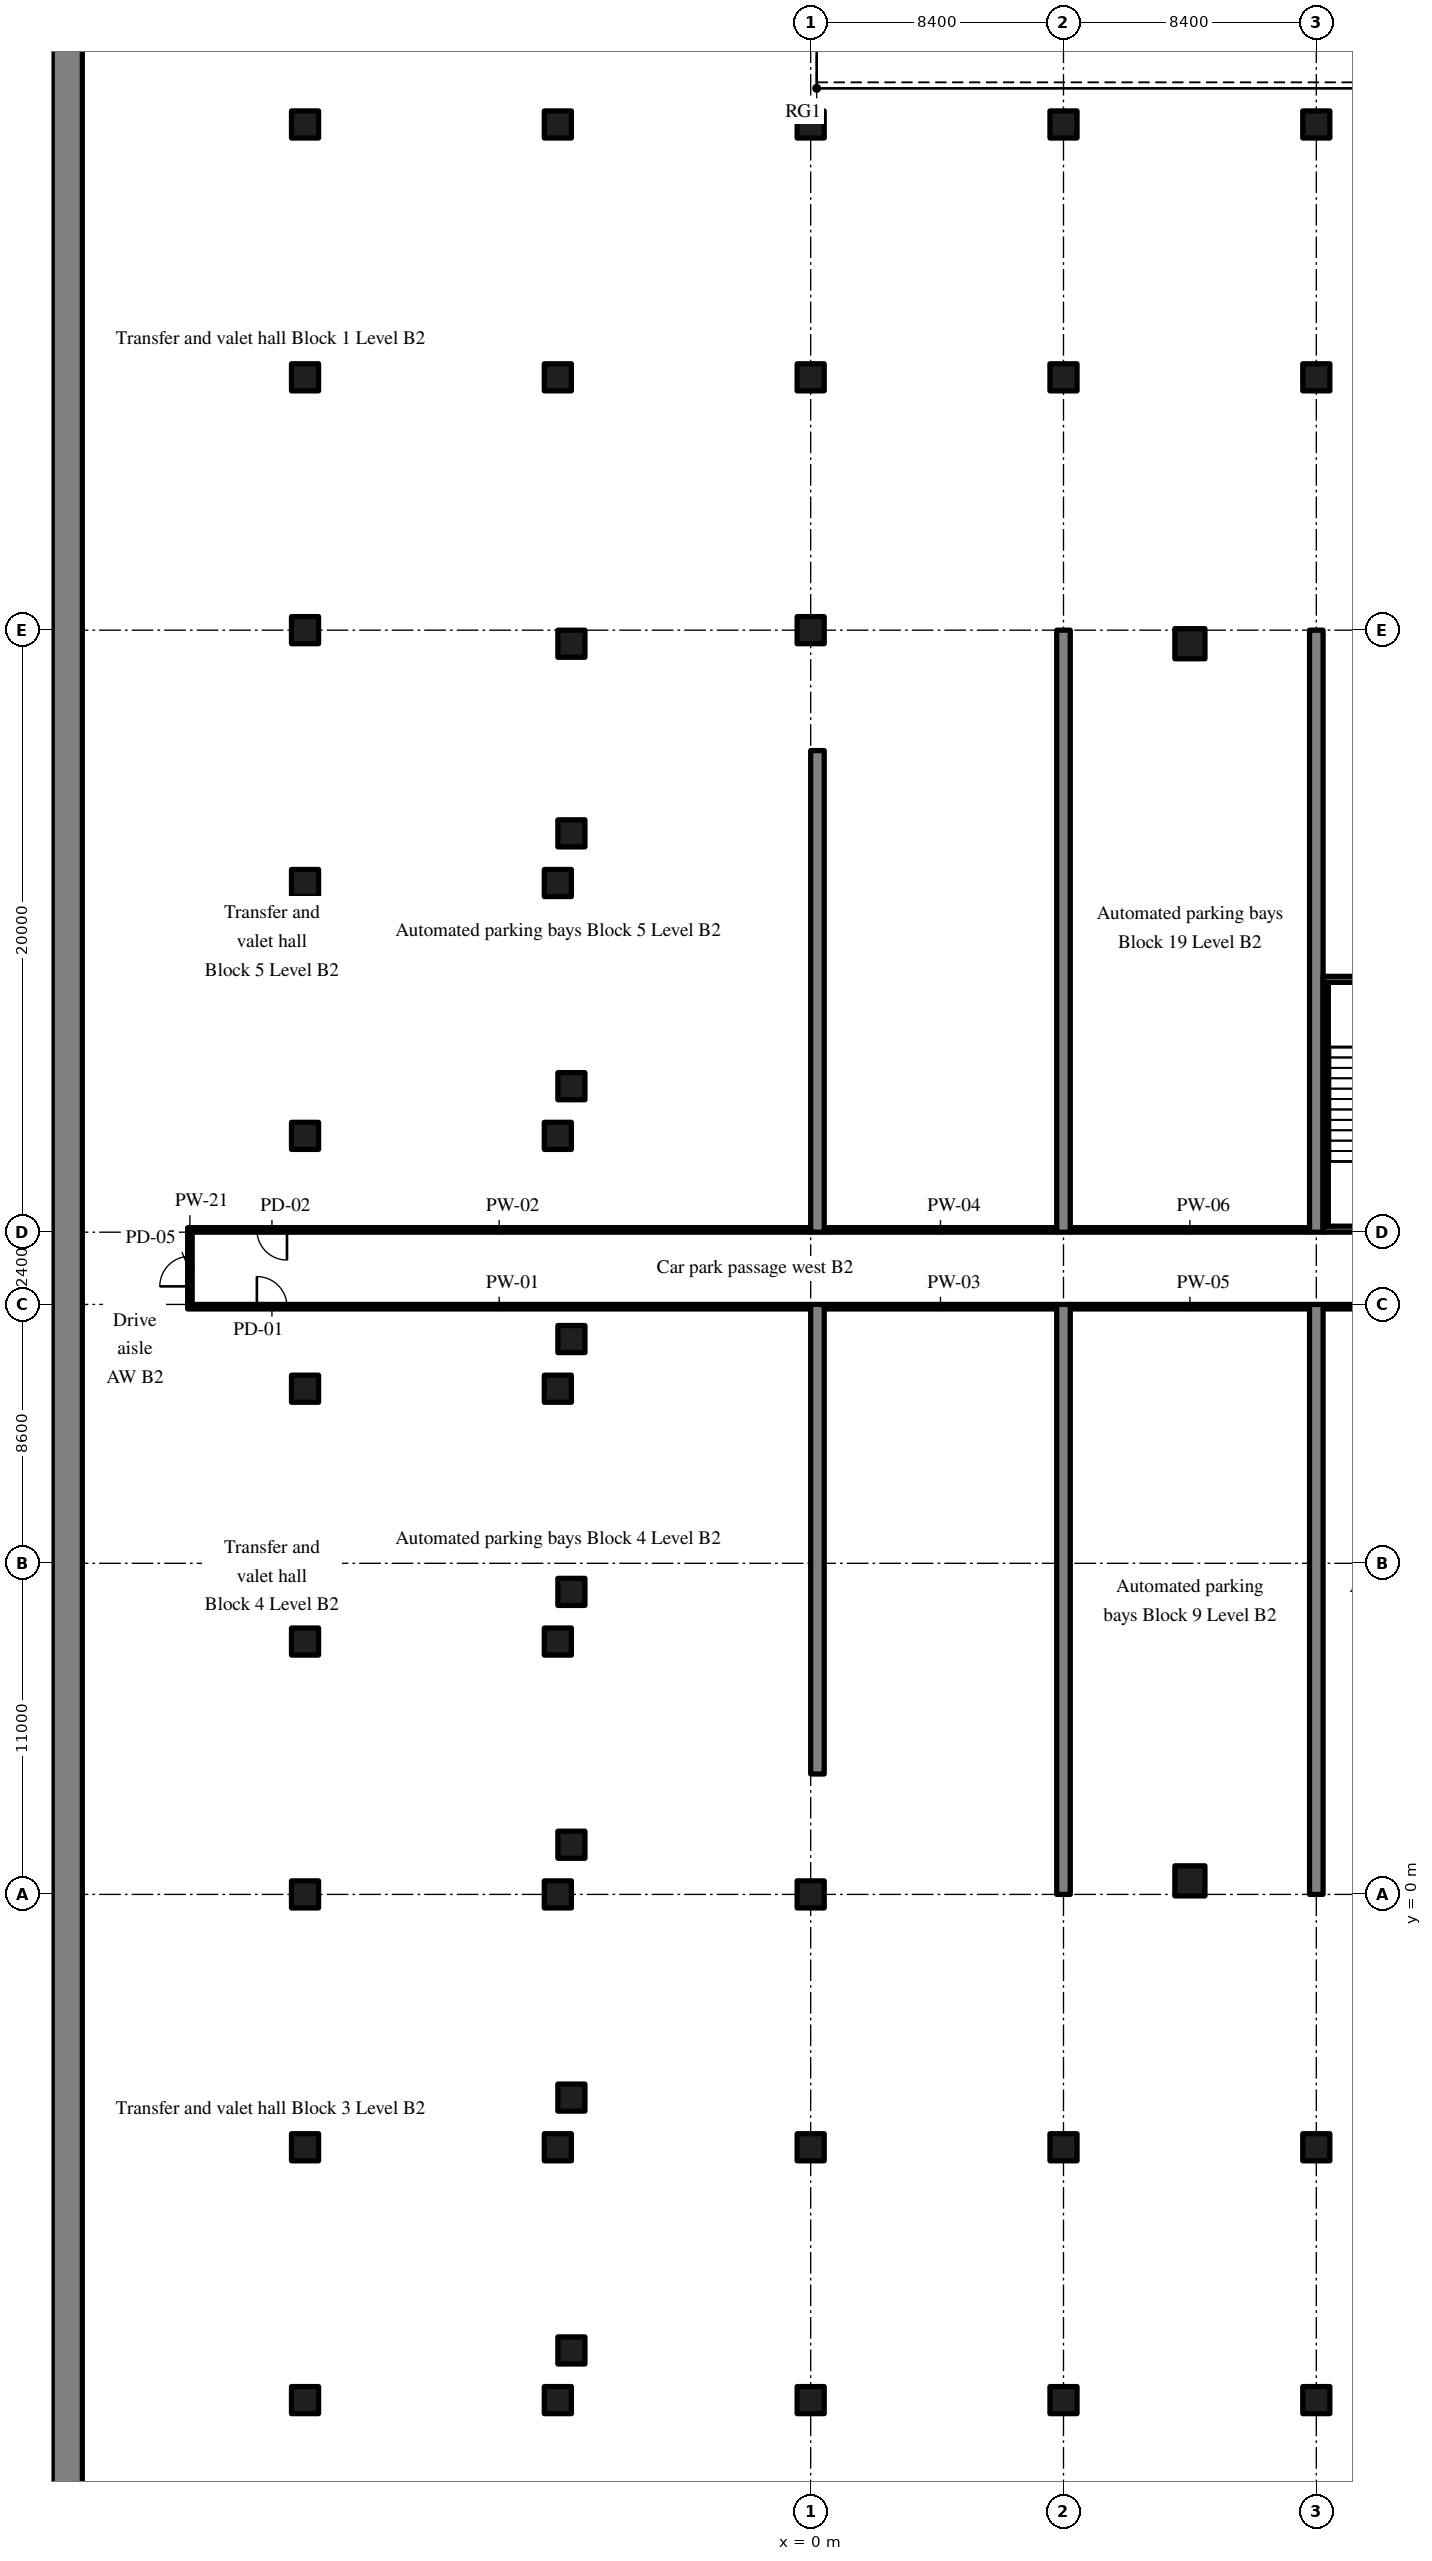
"""IFC4 building model, lengths in metres.
Left out: names, types, materials, properties, quantities, classifications, styles, units other than length and angle.
Written with IfcOpenShell. Run it as: python <this file> out.ifc"""

import sys

from ifc_helpers import new_model, si_unit, direction, frame, frame_2d, origin, origin_2d, place, context, subcontext, project, spatial, rectangle, extrude, source, transform, mapped, element, fill, save


model = new_model("IFC4")
c1 = context("Model", 3, precision=1e-05, world=origin(), true_north=direction((0.0, 1.0)))
c2 = subcontext(c1, "Body", "Model", "MODEL_VIEW")
j1 = project(units=[si_unit("LENGTHUNIT", "METRE"), si_unit("PLANEANGLEUNIT", "RADIAN")], contexts=[c1])
p1 = place(None, origin())
s1 = spatial("IfcSite", under=j1, at=p1, CompositionType="ELEMENT")
p2 = place(p1, origin())
s2 = spatial("IfcBuilding", under=s1, at=p2, CompositionType="ELEMENT")
p3 = place(p2, frame((0.0, 0.0, -9.0)))
s3 = spatial("IfcBuildingStorey", under=s2, at=p3, CompositionType="ELEMENT", Elevation=-9.0)
m1 = source(origin(), c2, "Body", "SweptSolid", [
    extrude(rectangle(XDim=98.8, YDim=1.0, at=frame_2d((49.4, 0.0))), origin(), (0.0, 0.0, 1.0), 4.22),
])
p4 = place(p3, frame((-24.7, -32.6, 0.0), z_axis=(0.0, 0.0, 1.0), x_axis=(0.0, 1.0, 0.0)))
e1 = element("IfcWall", 1, at=p4, inside=s3, PredefinedType="SHEAR", context=c2, shape_type="MappedRepresentation", body=[
    mapped(m1, transform((0.0, 0.0, 0.0), scale=1.0)),
])
m2 = source(origin(), c2, "Body", "SweptSolid", [
    extrude(rectangle(XDim=15.6, YDim=0.45, at=frame_2d((7.8, 0.0))), origin(), (0.0, 0.0, 1.0), 4.22),
])
p5 = place(p3, frame((0.225, 4.0, 0.0), z_axis=(0.0, 0.0, 1.0), x_axis=(0.0, 1.0, 0.0)))
e2 = element("IfcWall", 2, at=p5, inside=s3, PredefinedType="SHEAR", context=c2, shape_type="MappedRepresentation", body=[
    mapped(m2, transform((0.0, 0.0, 0.0), scale=1.0)),
])
m3 = source(origin(), c2, "Body", "SweptSolid", [
    extrude(rectangle(XDim=16.0, YDim=0.45, at=frame_2d((8.0, 0.0))), origin(), (0.0, 0.0, 1.0), 4.22),
])
p6 = place(p3, frame((0.225, 22.0, 0.0), z_axis=(0.0, 0.0, 1.0), x_axis=(0.0, 1.0, 0.0)))
e3 = element("IfcWall", 3, at=p6, inside=s3, PredefinedType="SHEAR", context=c2, shape_type="MappedRepresentation", body=[
    mapped(m3, transform((0.0, 0.0, 0.0), scale=1.0)),
])
m4 = source(origin(), c2, "Body", "SweptSolid", [
    extrude(rectangle(XDim=19.6, YDim=0.45, at=frame_2d((9.8, 0.0))), origin(), (0.0, 0.0, 1.0), 4.22),
])
p7 = place(p3, frame((8.4, 0.0, 0.0), z_axis=(0.0, 0.0, 1.0), x_axis=(0.0, 1.0, 0.0)))
e4 = element("IfcWall", 4, at=p7, inside=s3, PredefinedType="SHEAR", context=c2, shape_type="MappedRepresentation", body=[
    mapped(m4, transform((0.0, 0.0, 0.0), scale=1.0)),
])
m5 = source(origin(), c2, "Body", "SweptSolid", [
    extrude(rectangle(XDim=20.0, YDim=0.45, at=frame_2d((10.0, 0.0))), origin(), (0.0, 0.0, 1.0), 4.22),
])
p8 = place(p3, frame((8.4, 22.0, 0.0), z_axis=(0.0, 0.0, 1.0), x_axis=(0.0, 1.0, 0.0)))
e5 = element("IfcWall", 5, at=p8, inside=s3, PredefinedType="SHEAR", context=c2, shape_type="MappedRepresentation", body=[
    mapped(m5, transform((0.0, 0.0, 0.0), scale=1.0)),
])
p9 = place(p3, frame((16.8, 0.0, 0.0), z_axis=(0.0, 0.0, 1.0), x_axis=(0.0, 1.0, 0.0)))
e6 = element("IfcWall", 6, at=p9, inside=s3, PredefinedType="SHEAR", context=c2, shape_type="MappedRepresentation", body=[
    mapped(m4, transform((0.0, 0.0, 0.0), scale=1.0)),
])
p10 = place(p3, frame((16.8, 22.0, 0.0), z_axis=(0.0, 0.0, 1.0), x_axis=(0.0, 1.0, 0.0)))
e7 = element("IfcWall", 7, at=p10, inside=s3, PredefinedType="SHEAR", context=c2, shape_type="MappedRepresentation", body=[
    mapped(m5, transform((0.0, 0.0, 0.0), scale=1.0)),
])
m6 = source(origin(), c2, "Body", "SweptSolid", [
    extrude(rectangle(XDim=1.0, YDim=1.0, at=origin_2d()), origin(), (0.0, 0.0, 1.0), 4.22),
])
for number, where, z_axis, x_axis in (
    (8, (12.6, 0.45, 0.0), (0.0, 0.0, 1.0), (1.0, 0.0, 0.0)),
    (9, (12.6, 41.55, 0.0), (0.0, 0.0, 1.0), (1.0, 0.0, 0.0)),
):
    element("IfcColumn", number, at=place(p3, frame(where, z_axis=z_axis, x_axis=x_axis)), inside=s3, PredefinedType="COLUMN", context=c2, shape_type="MappedRepresentation", body=[
        mapped(m6, transform((0.0, 0.0, 0.0), scale=1.0)),
    ])
m7 = source(origin(), c2, "Body", "SweptSolid", [
    extrude(rectangle(XDim=0.9, YDim=0.9, at=origin_2d()), origin(), (0.0, 0.0, 1.0), 4.22),
])
for number, where, z_axis, x_axis in (
    (10, (-7.95, -15.15, 0.0), (0.0, 0.0, 1.0), (1.0, 0.0, 0.0)),
    (11, (-7.95, -6.75, 0.0), (0.0, 0.0, 1.0), (1.0, 0.0, 0.0)),
    (12, (-7.95, 1.65, 0.0), (0.0, 0.0, 1.0), (1.0, 0.0, 0.0)),
    (13, (-7.95, 10.05, 0.0), (0.0, 0.0, 1.0), (1.0, 0.0, 0.0)),
    (14, (-7.95, 18.45, 0.0), (0.0, 0.0, 1.0), (1.0, 0.0, 0.0)),
    (15, (-7.95, 26.85, 0.0), (0.0, 0.0, 1.0), (1.0, 0.0, 0.0)),
    (16, (-7.95, 35.25, 0.0), (0.0, 0.0, 1.0), (1.0, 0.0, 0.0)),
    (17, (-7.95, 41.55, 0.0), (0.0, 0.0, 1.0), (1.0, 0.0, 0.0)),
    (18, (-16.8, -16.8, 0.0), (0.0, 0.0, 1.0), (1.0, 0.0, 0.0)),
    (19, (-16.8, -8.4, 0.0), (0.0, 0.0, 1.0), (1.0, 0.0, 0.0)),
    (20, (-16.8, 0.0, 0.0), (0.0, 0.0, 1.0), (1.0, 0.0, 0.0)),
    (21, (-16.8, 8.4, 0.0), (0.0, 0.0, 1.0), (1.0, 0.0, 0.0)),
    (22, (-16.8, 16.8, 0.0), (0.0, 0.0, 1.0), (1.0, 0.0, 0.0)),
    (23, (-16.8, 25.2, 0.0), (0.0, 0.0, 1.0), (1.0, 0.0, 0.0)),
    (24, (-16.8, 33.6, 0.0), (0.0, 0.0, 1.0), (1.0, 0.0, 0.0)),
    (25, (-16.8, 42.0, 0.0), (0.0, 0.0, 1.0), (1.0, 0.0, 0.0)),
    (26, (-16.8, 50.4, 0.0), (0.0, 0.0, 1.0), (1.0, 0.0, 0.0)),
    (27, (-16.8, 58.8, 0.0), (0.0, 0.0, 1.0), (1.0, 0.0, 0.0)),
    (28, (-8.4, -16.8, 0.0), (0.0, 0.0, 1.0), (1.0, 0.0, 0.0)),
    (29, (-8.4, -8.4, 0.0), (0.0, 0.0, 1.0), (1.0, 0.0, 0.0)),
    (30, (-8.4, 0.0, 0.0), (0.0, 0.0, 1.0), (1.0, 0.0, 0.0)),
    (31, (-8.4, 8.4, 0.0), (0.0, 0.0, 1.0), (1.0, 0.0, 0.0)),
    (32, (-8.4, 16.8, 0.0), (0.0, 0.0, 1.0), (1.0, 0.0, 0.0)),
    (33, (-8.4, 25.2, 0.0), (0.0, 0.0, 1.0), (1.0, 0.0, 0.0)),
    (34, (-8.4, 33.6, 0.0), (0.0, 0.0, 1.0), (1.0, 0.0, 0.0)),
    (35, (-8.4, 50.4, 0.0), (0.0, 0.0, 1.0), (1.0, 0.0, 0.0)),
    (36, (-8.4, 58.8, 0.0), (0.0, 0.0, 1.0), (1.0, 0.0, 0.0)),
    (37, (0.0, -16.8, 0.0), (0.0, 0.0, 1.0), (1.0, 0.0, 0.0)),
    (38, (0.0, -8.4, 0.0), (0.0, 0.0, 1.0), (1.0, 0.0, 0.0)),
    (39, (0.0, 0.0, 0.0), (0.0, 0.0, 1.0), (1.0, 0.0, 0.0)),
    (40, (0.0, 42.0, 0.0), (0.0, 0.0, 1.0), (1.0, 0.0, 0.0)),
    (41, (0.0, 50.4, 0.0), (0.0, 0.0, 1.0), (1.0, 0.0, 0.0)),
    (42, (0.0, 58.8, 0.0), (0.0, 0.0, 1.0), (1.0, 0.0, 0.0)),
    (43, (8.4, -16.8, 0.0), (0.0, 0.0, 1.0), (1.0, 0.0, 0.0)),
    (44, (8.4, -8.4, 0.0), (0.0, 0.0, 1.0), (1.0, 0.0, 0.0)),
    (45, (8.4, 50.4, 0.0), (0.0, 0.0, 1.0), (1.0, 0.0, 0.0)),
    (46, (8.4, 58.8, 0.0), (0.0, 0.0, 1.0), (1.0, 0.0, 0.0)),
    (47, (16.8, -16.8, 0.0), (0.0, 0.0, 1.0), (1.0, 0.0, 0.0)),
    (48, (16.8, -8.4, 0.0), (0.0, 0.0, 1.0), (1.0, 0.0, 0.0)),
    (49, (16.8, 50.4, 0.0), (0.0, 0.0, 1.0), (1.0, 0.0, 0.0)),
    (50, (16.8, 58.8, 0.0), (0.0, 0.0, 1.0), (1.0, 0.0, 0.0)),
):
    element("IfcColumn", number, at=place(p3, frame(where, z_axis=z_axis, x_axis=x_axis)), inside=s3, PredefinedType="COLUMN", context=c2, shape_type="MappedRepresentation", body=[
        mapped(m7, transform((0.0, 0.0, 0.0), scale=1.0)),
    ])
m8 = source(origin(), c2, "Body", "SweptSolid", [
    extrude(rectangle(XDim=8.175, YDim=0.2, at=frame_2d((4.087, 0.0))), origin(), (0.0, 0.0, 1.0), 4.22),
])
p11 = place(p3, frame((17.025, 22.1, 0.0), z_axis=(0.0, 0.0, 1.0), x_axis=(1.0, 0.0, 0.0)))
e51 = element("IfcWall", 51, at=p11, inside=s3, PredefinedType="SOLIDWALL", context=c2, shape_type="MappedRepresentation", body=[
    mapped(m8, transform((0.0, 0.0, 0.0), scale=1.0)),
])
m9 = source(origin(), c2, "Body", "SweptSolid", [
    extrude(rectangle(XDim=1.2, YDim=2.1, at=frame_2d((0.6, 1.05))), frame((0.0, 0.11, 0.0), z_axis=(0.0, -1.0, 0.0), x_axis=(1.0, 0.0, 0.0)), (0.0, 0.0, 1.0), 0.22),
])
p12 = place(p11, frame((5.975, 0.0, 0.0)))
e52 = element("IfcOpeningElement", 52, at=p12, cuts=e51, PredefinedType="OPENING", context=c2, shape_type="MappedRepresentation", body=[
    mapped(m9, transform((0.0, 0.0, 0.0), scale=1.0)),
])
p13 = place(p3, frame((17.025, 30.4, 0.0), z_axis=(0.0, 0.0, 1.0), x_axis=(1.0, 0.0, 0.0)))
e53 = element("IfcWall", 53, at=p13, inside=s3, PredefinedType="SOLIDWALL", context=c2, shape_type="MappedRepresentation", body=[
    mapped(m8, transform((0.0, 0.0, 0.0), scale=1.0)),
])
m10 = source(origin(), c2, "Body", "SweptSolid", [
    extrude(rectangle(XDim=1.0, YDim=2.1, at=frame_2d((0.5, 1.05))), frame((0.0, 0.11, 0.0), z_axis=(0.0, -1.0, 0.0), x_axis=(1.0, 0.0, 0.0)), (0.0, 0.0, 1.0), 0.22),
])
p14 = place(p13, frame((6.075, 0.0, 0.0)))
e54 = element("IfcOpeningElement", 54, at=p14, cuts=e53, PredefinedType="OPENING", context=c2, shape_type="MappedRepresentation", body=[
    mapped(m10, transform((0.0, 0.0, 0.0), scale=1.0)),
])
m11 = source(origin(), c2, "Body", "SweptSolid", [
    extrude(rectangle(XDim=8.1, YDim=0.175, at=frame_2d((4.05, 0.0))), origin(), (0.0, 0.0, 1.0), 4.22),
])
p15 = place(p3, frame((17.112, 22.2, 0.0), z_axis=(0.0, 0.0, 1.0), x_axis=(0.0, 1.0, 0.0)))
e55 = element("IfcWall", 55, at=p15, inside=s3, PredefinedType="SOLIDWALL", context=c2, shape_type="MappedRepresentation", body=[
    mapped(m11, transform((0.0, 0.0, 0.0), scale=1.0)),
])
m12 = source(origin(), c2, "Body", "SweptSolid", [
    extrude(rectangle(XDim=20.7, YDim=0.15, at=frame_2d((10.35, 0.0))), origin(), (0.0, 0.0, 1.0), 4.22),
])
p16 = place(p3, frame((-20.7, 19.525, 0.0), z_axis=(0.0, 0.0, 1.0), x_axis=(1.0, 0.0, 0.0)))
e56 = element("IfcWall", 56, at=p16, inside=s3, PredefinedType="PARTITIONING", context=c2, shape_type="MappedRepresentation", body=[
    mapped(m12, transform((0.0, 0.0, 0.0), scale=1.0)),
])
m13 = source(origin(), c2, "Body", "SweptSolid", [
    extrude(rectangle(XDim=1.0, YDim=2.1, at=frame_2d((0.5, 1.05))), frame((0.0, 0.085, 0.0), z_axis=(0.0, -1.0, 0.0), x_axis=(1.0, 0.0, 0.0)), (0.0, 0.0, 1.0), 0.17),
])
p17 = place(p16, frame((2.3, 0.0, 0.0)))
e57 = element("IfcOpeningElement", 57, at=p17, cuts=e56, PredefinedType="OPENING", context=c2, shape_type="MappedRepresentation", body=[
    mapped(m13, transform((0.0, 0.0, 0.0), scale=1.0)),
])
p18 = place(p3, frame((-20.7, 22.075, 0.0), z_axis=(0.0, 0.0, 1.0), x_axis=(1.0, 0.0, 0.0)))
e58 = element("IfcWall", 58, at=p18, inside=s3, PredefinedType="PARTITIONING", context=c2, shape_type="MappedRepresentation", body=[
    mapped(m12, transform((0.0, 0.0, 0.0), scale=1.0)),
])
p19 = place(p18, frame((2.3, 0.0, 0.0)))
e59 = element("IfcOpeningElement", 59, at=p19, cuts=e58, PredefinedType="OPENING", context=c2, shape_type="MappedRepresentation", body=[
    mapped(m13, transform((0.0, 0.0, 0.0), scale=1.0)),
])
m14 = source(origin(), c2, "Body", "SweptSolid", [
    extrude(rectangle(XDim=7.725, YDim=0.15, at=frame_2d((3.863, 0.0))), origin(), (0.0, 0.0, 1.0), 4.22),
])
for number, where, z_axis, x_axis in (
    (60, (0.45, 19.525, 0.0), (0.0, 0.0, 1.0), (1.0, 0.0, 0.0)),
    (61, (0.45, 22.075, 0.0), (0.0, 0.0, 1.0), (1.0, 0.0, 0.0)),
):
    element("IfcWall", number, at=place(p3, frame(where, z_axis=z_axis, x_axis=x_axis)), inside=s3, PredefinedType="PARTITIONING", context=c2, shape_type="MappedRepresentation", body=[
        mapped(m14, transform((0.0, 0.0, 0.0), scale=1.0)),
    ])
m15 = source(origin(), c2, "Body", "SweptSolid", [
    extrude(rectangle(XDim=7.95, YDim=0.15, at=frame_2d((3.975, 0.0))), origin(), (0.0, 0.0, 1.0), 4.22),
])
for number, where, z_axis, x_axis in (
    (62, (8.625, 19.525, 0.0), (0.0, 0.0, 1.0), (1.0, 0.0, 0.0)),
    (63, (8.625, 22.075, 0.0), (0.0, 0.0, 1.0), (1.0, 0.0, 0.0)),
):
    element("IfcWall", number, at=place(p3, frame(where, z_axis=z_axis, x_axis=x_axis)), inside=s3, PredefinedType="PARTITIONING", context=c2, shape_type="MappedRepresentation", body=[
        mapped(m15, transform((0.0, 0.0, 0.0), scale=1.0)),
    ])
m16 = source(origin(), c2, "Body", "SweptSolid", [
    extrude(rectangle(XDim=7.95, YDim=0.15, at=frame_2d((3.975, 0.0))), origin(), (0.0, 0.0, 1.0), 4.22),
])
p20 = place(p3, frame((17.025, 19.525, 0.0), z_axis=(0.0, 0.0, 1.0), x_axis=(1.0, 0.0, 0.0)))
e64 = element("IfcWall", 64, at=p20, inside=s3, PredefinedType="PARTITIONING", context=c2, shape_type="MappedRepresentation", body=[
    mapped(m16, transform((0.0, 0.0, 0.0), scale=1.0)),
])
m17 = source(origin(), c2, "Body", "SweptSolid", [
    extrude(rectangle(XDim=2.4, YDim=0.15, at=frame_2d((1.2, 0.0))), origin(), (0.0, 0.0, 1.0), 4.22),
])
p21 = place(p3, frame((-20.625, 19.6, 0.0), z_axis=(0.0, 0.0, 1.0), x_axis=(0.0, 1.0, 0.0)))
e65 = element("IfcWall", 65, at=p21, inside=s3, PredefinedType="PARTITIONING", context=c2, shape_type="MappedRepresentation", body=[
    mapped(m17, transform((0.0, 0.0, 0.0), scale=1.0)),
])
p22 = place(p21, frame((0.6, 0.0, 0.0)))
e66 = element("IfcOpeningElement", 66, at=p22, cuts=e65, PredefinedType="OPENING", context=c2, shape_type="MappedRepresentation", body=[
    mapped(m13, transform((0.0, 0.0, 0.0), scale=1.0)),
])
m18 = source(origin(), c2, "Body", "SweptSolid", [
    extrude(rectangle(XDim=1.0, YDim=2.1, at=frame_2d((0.5, 1.05))), frame((0.0, 0.025, 0.0), z_axis=(0.0, -1.0, 0.0), x_axis=(1.0, 0.0, 0.0)), (0.0, 0.0, 1.0), 0.05),
])
p23 = place(p17, origin())
e67 = element("IfcDoor", 67, at=p23, inside=s3, OperationType="SINGLE_SWING_LEFT", PredefinedType="DOOR", context=c2, shape_type="MappedRepresentation", body=[
    mapped(m18, transform((0.0, 0.0, 0.0), scale=1.0)),
])
fill(e57, e67)
p24 = place(p19, origin())
e68 = element("IfcDoor", 68, at=p24, inside=s3, OperationType="SINGLE_SWING_RIGHT", PredefinedType="DOOR", context=c2, shape_type="MappedRepresentation", body=[
    mapped(m18, transform((0.0, 0.0, 0.0), scale=1.0)),
])
fill(e59, e68)
p25 = place(p22, origin())
e69 = element("IfcDoor", 69, at=p25, inside=s3, OperationType="SINGLE_SWING_LEFT", PredefinedType="DOOR", context=c2, shape_type="MappedRepresentation", body=[
    mapped(m18, transform((0.0, 0.0, 0.0), scale=1.0)),
])
fill(e66, e69)
save(model, sys.argv[1])
